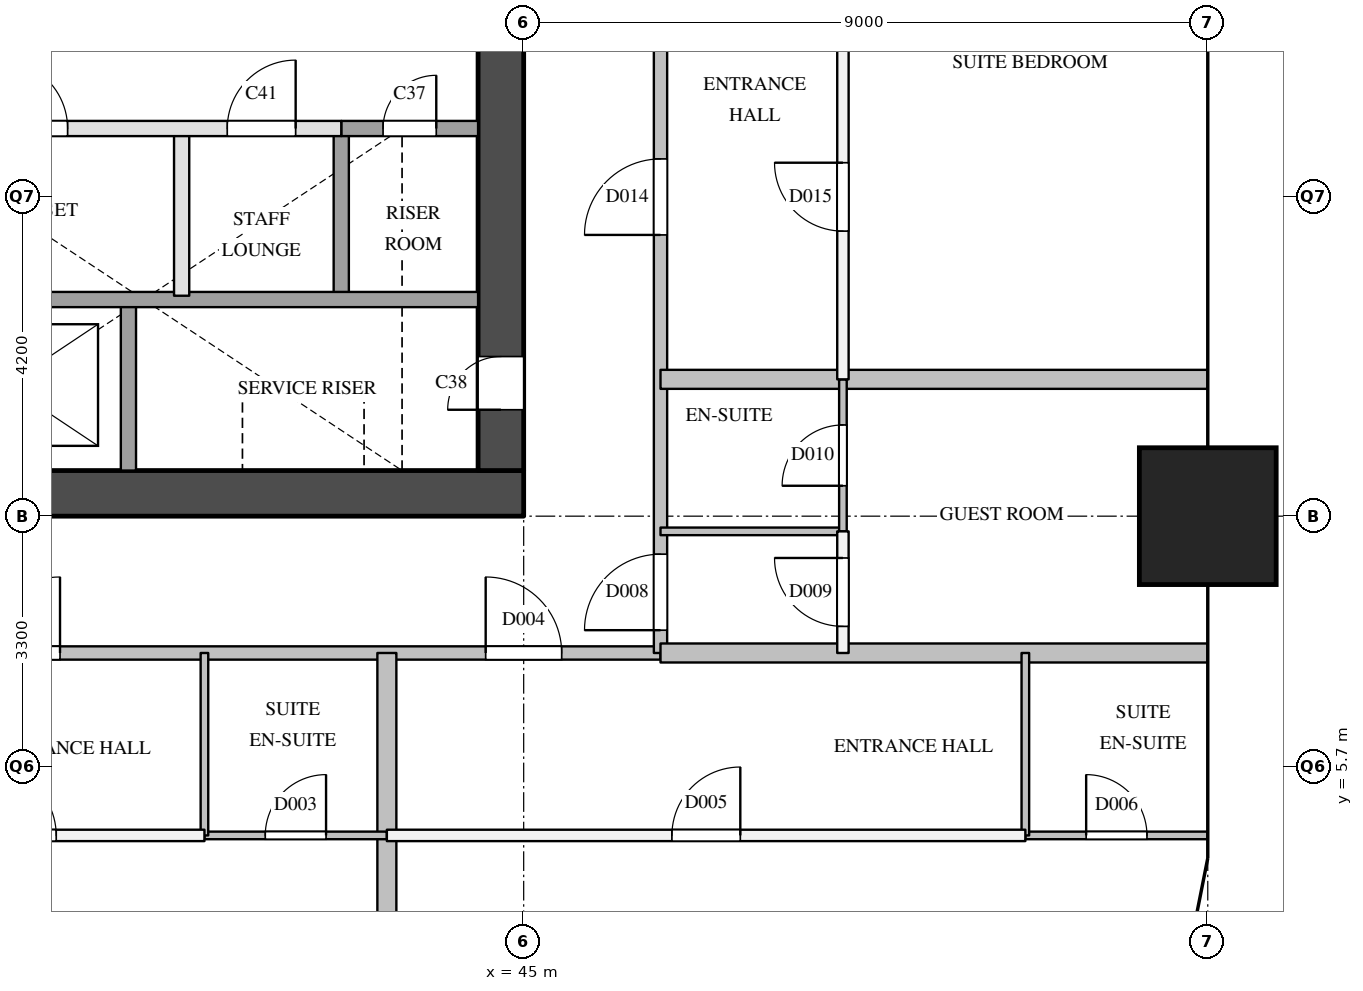
"""IFC4 building model, lengths in metres.
Left out: names, types, materials, properties, quantities, classifications, styles, units other than length and angle.
Written with IfcOpenShell. Run it as: python <this file> out.ifc"""

import sys

from ifc_helpers import new_model, si_unit, direction, frame, frame_2d, origin, origin_2d, place, context, subcontext, project, spatial, rectangle, extrude, element, fill, save


model = new_model("IFC4")
c1 = context("Model", 3, precision=1e-05, world=origin(), true_north=direction((0.0, 1.0)))
c2 = subcontext(c1, "Body", "Model", "MODEL_VIEW")
j1 = project(units=[si_unit("LENGTHUNIT", "METRE"), si_unit("PLANEANGLEUNIT", "RADIAN")], contexts=[c1])
p1 = place(None, origin())
s1 = spatial("IfcSite", under=j1, at=p1, CompositionType="ELEMENT")
p2 = place(p1, origin())
s2 = spatial("IfcBuilding", under=s1, at=p2, CompositionType="ELEMENT")
p3 = place(p2, frame((0.0, 0.0, 112.0)))
s3 = spatial("IfcBuildingStorey", under=s2, at=p3, CompositionType="ELEMENT", Elevation=112.0)
p4 = place(p3, frame((54.0, 9.0, 0.0), z_axis=(0.0, 0.0, 1.0), x_axis=(1.0, 0.0, 0.0)))
e1 = element("IfcColumn", 1, at=p4, inside=s3, PredefinedType="COLUMN", context=c2, shape_type="SweptSolid", body=[
    extrude(rectangle(XDim=1.8, YDim=1.8, at=origin_2d()), origin(), (0.0, 0.0, 1.0), 3.8),
])
p5 = place(p3, frame((36.0, 9.3, 0.0), z_axis=(0.0, 0.0, 1.0), x_axis=(1.0, 0.0, 0.0)))
e2 = element("IfcWall", 2, at=p5, inside=s3, PredefinedType="SHEAR", context=c2, shape_type="SweptSolid", body=[
    extrude(rectangle(XDim=9.0, YDim=0.6, at=frame_2d((4.5, 0.0))), origin(), (0.0, 0.0, 1.0), 3.5),
])
p6 = place(p3, frame((44.7, 9.6, 0.0), z_axis=(0.0, 0.0, 1.0), x_axis=(0.0, 1.0, 0.0)))
e3 = element("IfcWall", 3, at=p6, inside=s3, PredefinedType="SHEAR", context=c2, shape_type="SweptSolid", body=[
    extrude(rectangle(XDim=12.3, YDim=0.6, at=frame_2d((6.15, 0.0))), origin(), (0.0, 0.0, 1.0), 3.5),
])
p7 = place(p6, frame((0.8, 0.0, 0.0)))
e4 = element("IfcOpeningElement", 4, at=p7, cuts=e3, PredefinedType="OPENING", context=c2, shape_type="SweptSolid", body=[
    extrude(rectangle(XDim=0.7, YDim=2.1, at=frame_2d((0.35, 1.05))), frame((0.0, 0.31, 0.0), z_axis=(0.0, -1.0, 0.0), x_axis=(1.0, 0.0, 0.0)), (0.0, 0.0, 1.0), 0.62),
])
p8 = place(p3, frame((39.8, 9.6, 0.0), z_axis=(0.0, 0.0, 1.0), x_axis=(0.0, 1.0, 0.0)))
e5 = element("IfcWall", 5, at=p8, inside=s3, PredefinedType="SOLIDWALL", context=c2, shape_type="SweptSolid", body=[
    extrude(rectangle(XDim=2.3, YDim=0.2, at=frame_2d((1.15, 0.0))), origin(), (0.0, 0.0, 1.0), 3.5),
])
p9 = place(p3, frame((40.5, 11.9, 0.0), z_axis=(0.0, 0.0, 1.0), x_axis=(0.0, 1.0, 0.0)))
e6 = element("IfcWall", 6, at=p9, inside=s3, PredefinedType="PARTITIONING", context=c2, shape_type="SweptSolid", body=[
    extrude(rectangle(XDim=2.2, YDim=0.2, at=frame_2d((1.1, 0.0))), origin(), (0.0, 0.0, 1.0), 3.5),
])
p10 = place(p3, frame((42.6, 11.9, 0.0), z_axis=(0.0, 0.0, 1.0), x_axis=(0.0, 1.0, 0.0)))
e7 = element("IfcWall", 7, at=p10, inside=s3, PredefinedType="SOLIDWALL", context=c2, shape_type="SweptSolid", body=[
    extrude(rectangle(XDim=2.2, YDim=0.2, at=frame_2d((1.1, 0.0))), origin(), (0.0, 0.0, 1.0), 3.5),
])
p11 = place(p3, frame((36.6, 11.85, 0.0), z_axis=(0.0, 0.0, 1.0), x_axis=(1.0, 0.0, 0.0)))
e8 = element("IfcWall", 8, at=p11, inside=s3, PredefinedType="SOLIDWALL", context=c2, shape_type="SweptSolid", body=[
    extrude(rectangle(XDim=7.8, YDim=0.2, at=frame_2d((3.9, 0.0))), origin(), (0.0, 0.0, 1.0), 3.5),
])
p12 = place(p3, frame((36.6, 14.1, 0.0), z_axis=(0.0, 0.0, 1.0), x_axis=(1.0, 0.0, 0.0)))
e9 = element("IfcWall", 9, at=p12, inside=s3, PredefinedType="PARTITIONING", context=c2, shape_type="SweptSolid", body=[
    extrude(rectangle(XDim=6.0, YDim=0.2, at=frame_2d((3.0, 0.0))), origin(), (0.0, 0.0, 1.0), 3.5),
])
p13 = place(p12, frame((1.5, 0.0, 0.0)))
e10 = element("IfcOpeningElement", 10, at=p13, cuts=e9, PredefinedType="OPENING", context=c2, shape_type="SweptSolid", body=[
    extrude(rectangle(XDim=0.9, YDim=2.1, at=frame_2d((0.45, 1.05))), frame((0.0, 0.11, 0.0), z_axis=(0.0, -1.0, 0.0), x_axis=(1.0, 0.0, 0.0)), (0.0, 0.0, 1.0), 0.22),
])
p14 = place(p12, frame((4.5, 0.0, 0.0)))
e11 = element("IfcOpeningElement", 11, at=p14, cuts=e9, PredefinedType="OPENING", context=c2, shape_type="SweptSolid", body=[
    extrude(rectangle(XDim=0.9, YDim=2.1, at=frame_2d((0.45, 1.05))), frame((0.0, 0.11, 0.0), z_axis=(0.0, -1.0, 0.0), x_axis=(1.0, 0.0, 0.0)), (0.0, 0.0, 1.0), 0.22),
])
p15 = place(p3, frame((42.6, 14.1, 0.0), z_axis=(0.0, 0.0, 1.0), x_axis=(1.0, 0.0, 0.0)))
e12 = element("IfcWall", 12, at=p15, inside=s3, PredefinedType="SOLIDWALL", context=c2, shape_type="SweptSolid", body=[
    extrude(rectangle(XDim=1.8, YDim=0.2, at=frame_2d((0.9, 0.0))), origin(), (0.0, 0.0, 1.0), 3.5),
])
p16 = place(p15, frame((0.55, 0.0, 0.0)))
e13 = element("IfcOpeningElement", 13, at=p16, cuts=e12, PredefinedType="OPENING", context=c2, shape_type="SweptSolid", body=[
    extrude(rectangle(XDim=0.7, YDim=2.1, at=frame_2d((0.35, 1.05))), frame((0.0, 0.11, 0.0), z_axis=(0.0, -1.0, 0.0), x_axis=(1.0, 0.0, 0.0)), (0.0, 0.0, 1.0), 0.22),
])
p17 = place(p3, frame((34.2, 7.2, 0.0), z_axis=(0.0, 0.0, 1.0), x_axis=(1.0, 0.0, 0.0)))
e14 = element("IfcWall", 14, at=p17, inside=s3, PredefinedType="PARTITIONING", context=c2, shape_type="SweptSolid", body=[
    extrude(rectangle(XDim=12.6, YDim=0.175, at=frame_2d((6.3, 0.0))), origin(), (0.0, 0.0, 1.0), 3.5),
])
p18 = place(p17, frame((3.7, 0.0, 0.0)))
e15 = element("IfcOpeningElement", 15, at=p18, cuts=e14, PredefinedType="OPENING", context=c2, shape_type="SweptSolid", body=[
    extrude(rectangle(XDim=1.0, YDim=2.1, at=frame_2d((0.5, 1.05))), frame((0.0, 0.097, 0.0), z_axis=(0.0, -1.0, 0.0), x_axis=(1.0, 0.0, 0.0)), (0.0, 0.0, 1.0), 0.195),
])
p19 = place(p17, frame((10.3, 0.0, 0.0)))
e16 = element("IfcOpeningElement", 16, at=p19, cuts=e14, PredefinedType="OPENING", context=c2, shape_type="SweptSolid", body=[
    extrude(rectangle(XDim=1.0, YDim=2.1, at=frame_2d((0.5, 1.05))), frame((0.0, 0.097, 0.0), z_axis=(0.0, -1.0, 0.0), x_axis=(1.0, 0.0, 0.0)), (0.0, 0.0, 1.0), 0.195),
])
p20 = place(p3, frame((46.8, 7.2, 0.0), z_axis=(0.0, 0.0, 1.0), x_axis=(0.0, 1.0, 0.0)))
e17 = element("IfcWall", 17, at=p20, inside=s3, PredefinedType="PARTITIONING", context=c2, shape_type="SweptSolid", body=[
    extrude(rectangle(XDim=16.49, YDim=0.175, at=frame_2d((8.245, 0.0))), origin(), (0.0, 0.0, 1.0), 3.5),
])
p21 = place(p20, frame((0.3, 0.0, 0.0)))
e18 = element("IfcOpeningElement", 18, at=p21, cuts=e17, PredefinedType="OPENING", context=c2, shape_type="SweptSolid", body=[
    extrude(rectangle(XDim=1.0, YDim=2.1, at=frame_2d((0.5, 1.05))), frame((0.0, 0.097, 0.0), z_axis=(0.0, -1.0, 0.0), x_axis=(1.0, 0.0, 0.0)), (0.0, 0.0, 1.0), 0.195),
])
p22 = place(p20, frame((5.5, 0.0, 0.0)))
e19 = element("IfcOpeningElement", 19, at=p22, cuts=e17, PredefinedType="OPENING", context=c2, shape_type="SweptSolid", body=[
    extrude(rectangle(XDim=1.0, YDim=2.1, at=frame_2d((0.5, 1.05))), frame((0.0, 0.097, 0.0), z_axis=(0.0, -1.0, 0.0), x_axis=(1.0, 0.0, 0.0)), (0.0, 0.0, 1.0), 0.195),
])
p23 = place(p20, frame((11.1, 0.0, 0.0)))
e20 = element("IfcOpeningElement", 20, at=p23, cuts=e17, PredefinedType="OPENING", context=c2, shape_type="SweptSolid", body=[
    extrude(rectangle(XDim=1.0, YDim=2.1, at=frame_2d((0.5, 1.05))), frame((0.0, 0.097, 0.0), z_axis=(0.0, -1.0, 0.0), x_axis=(1.0, 0.0, 0.0)), (0.0, 0.0, 1.0), 0.195),
])
p24 = place(p3, frame((36.0, 4.8, 0.0), z_axis=(0.0, 0.0, 1.0), x_axis=(1.0, 0.0, 0.0)))
e21 = element("IfcWall", 21, at=p24, inside=s3, PredefinedType="PARTITIONING", context=c2, shape_type="SweptSolid", body=[
    extrude(rectangle(XDim=4.8, YDim=0.15, at=frame_2d((2.4, 0.0))), origin(), (0.0, 0.0, 1.0), 3.5),
])
p25 = place(p24, frame((1.95, 0.0, 0.0)))
e22 = element("IfcOpeningElement", 22, at=p25, cuts=e21, PredefinedType="OPENING", context=c2, shape_type="SweptSolid", body=[
    extrude(rectangle(XDim=0.9, YDim=2.1, at=frame_2d((0.45, 1.05))), frame((0.0, 0.085, 0.0), z_axis=(0.0, -1.0, 0.0), x_axis=(1.0, 0.0, 0.0)), (0.0, 0.0, 1.0), 0.17),
])
p26 = place(p3, frame((43.2, 4.8, 0.0), z_axis=(0.0, 0.0, 1.0), x_axis=(1.0, 0.0, 0.0)))
e23 = element("IfcWall", 23, at=p26, inside=s3, PredefinedType="PARTITIONING", context=c2, shape_type="SweptSolid", body=[
    extrude(rectangle(XDim=8.4, YDim=0.15, at=frame_2d((4.2, 0.0))), origin(), (0.0, 0.0, 1.0), 3.5),
])
p27 = place(p26, frame((3.75, 0.0, 0.0)))
e24 = element("IfcOpeningElement", 24, at=p27, cuts=e23, PredefinedType="OPENING", context=c2, shape_type="SweptSolid", body=[
    extrude(rectangle(XDim=0.9, YDim=2.1, at=frame_2d((0.45, 1.05))), frame((0.0, 0.085, 0.0), z_axis=(0.0, -1.0, 0.0), x_axis=(1.0, 0.0, 0.0)), (0.0, 0.0, 1.0), 0.17),
])
p28 = place(p3, frame((49.2, 7.2, 0.0), z_axis=(0.0, 0.0, 1.0), x_axis=(0.0, 1.0, 0.0)))
e25 = element("IfcWall", 25, at=p28, inside=s3, PredefinedType="PARTITIONING", context=c2, shape_type="SweptSolid", body=[
    extrude(rectangle(XDim=1.6, YDim=0.15, at=frame_2d((0.8, 0.0))), origin(), (0.0, 0.0, 1.0), 3.5),
])
p29 = place(p28, frame((0.35, 0.0, 0.0)))
e26 = element("IfcOpeningElement", 26, at=p29, cuts=e25, PredefinedType="OPENING", context=c2, shape_type="SweptSolid", body=[
    extrude(rectangle(XDim=0.9, YDim=2.1, at=frame_2d((0.45, 1.05))), frame((0.0, 0.085, 0.0), z_axis=(0.0, -1.0, 0.0), x_axis=(1.0, 0.0, 0.0)), (0.0, 0.0, 1.0), 0.17),
])
p30 = place(p3, frame((49.2, 10.8, 0.0), z_axis=(0.0, 0.0, 1.0), x_axis=(0.0, 1.0, 0.0)))
e27 = element("IfcWall", 27, at=p30, inside=s3, PredefinedType="PARTITIONING", context=c2, shape_type="SweptSolid", body=[
    extrude(rectangle(XDim=4.8, YDim=0.15, at=frame_2d((2.4, 0.0))), origin(), (0.0, 0.0, 1.0), 3.5),
])
p31 = place(p30, frame((1.95, 0.0, 0.0)))
e28 = element("IfcOpeningElement", 28, at=p31, cuts=e27, PredefinedType="OPENING", context=c2, shape_type="SweptSolid", body=[
    extrude(rectangle(XDim=0.9, YDim=2.1, at=frame_2d((0.45, 1.05))), frame((0.0, 0.085, 0.0), z_axis=(0.0, -1.0, 0.0), x_axis=(1.0, 0.0, 0.0)), (0.0, 0.0, 1.0), 0.17),
])
for number, where, z_axis, x_axis in (
    (29, (46.8, 7.2, 0.0), (0.0, 0.0, 1.0), (1.0, 0.0, 0.0)),
    (30, (46.8, 10.8, 0.0), (0.0, 0.0, 1.0), (1.0, 0.0, 0.0)),
    (31, (43.2, 0.0, 0.0), (0.0, 0.0, 1.0), (0.0, 1.0, 0.0)),
):
    element("IfcWall", number, at=place(p3, frame(where, z_axis=z_axis, x_axis=x_axis)), inside=s3, PredefinedType="PARTITIONING", context=c2, shape_type="SweptSolid", body=[
        extrude(rectangle(XDim=7.2, YDim=0.25, at=frame_2d((3.6, 0.0))), origin(), (0.0, 0.0, 1.0), 2.5),
    ])
p32 = place(p3, frame((40.8, 4.8, 0.0), z_axis=(0.0, 0.0, 1.0), x_axis=(1.0, 0.0, 0.0)))
e32 = element("IfcWall", 32, at=p32, inside=s3, PredefinedType="PARTITIONING", context=c2, shape_type="SweptSolid", body=[
    extrude(rectangle(XDim=2.4, YDim=0.1, at=frame_2d((1.2, 0.0))), origin(), (0.0, 0.0, 1.0), 3.5),
])
p33 = place(p32, frame((0.8, 0.0, 0.0)))
e33 = element("IfcOpeningElement", 33, at=p33, cuts=e32, PredefinedType="OPENING", context=c2, shape_type="SweptSolid", body=[
    extrude(rectangle(XDim=0.8, YDim=2.1, at=frame_2d((0.4, 1.05))), frame((0.0, 0.06, 0.0), z_axis=(0.0, -1.0, 0.0), x_axis=(1.0, 0.0, 0.0)), (0.0, 0.0, 1.0), 0.12),
])
p34 = place(p3, frame((51.6, 4.8, 0.0), z_axis=(0.0, 0.0, 1.0), x_axis=(1.0, 0.0, 0.0)))
e34 = element("IfcWall", 34, at=p34, inside=s3, PredefinedType="PARTITIONING", context=c2, shape_type="SweptSolid", body=[
    extrude(rectangle(XDim=2.4, YDim=0.1, at=frame_2d((1.2, 0.0))), origin(), (0.0, 0.0, 1.0), 2.5),
])
p35 = place(p34, frame((0.8, 0.0, 0.0)))
e35 = element("IfcOpeningElement", 35, at=p35, cuts=e34, PredefinedType="OPENING", context=c2, shape_type="SweptSolid", body=[
    extrude(rectangle(XDim=0.8, YDim=2.1, at=frame_2d((0.4, 1.05))), frame((0.0, 0.06, 0.0), z_axis=(0.0, -1.0, 0.0), x_axis=(1.0, 0.0, 0.0)), (0.0, 0.0, 1.0), 0.12),
])
for number, where, z_axis, x_axis in (
    (36, (46.8, 8.8, 0.0), (0.0, 0.0, 1.0), (1.0, 0.0, 0.0)),
    (37, (40.8, 4.8, 0.0), (0.0, 0.0, 1.0), (0.0, 1.0, 0.0)),
):
    element("IfcWall", number, at=place(p3, frame(where, z_axis=z_axis, x_axis=x_axis)), inside=s3, PredefinedType="PARTITIONING", context=c2, shape_type="SweptSolid", body=[
        extrude(rectangle(XDim=2.4, YDim=0.1, at=frame_2d((1.2, 0.0))), origin(), (0.0, 0.0, 1.0), 3.5),
    ])
p36 = place(p3, frame((49.2, 8.8, 0.0), z_axis=(0.0, 0.0, 1.0), x_axis=(0.0, 1.0, 0.0)))
e38 = element("IfcWall", 38, at=p36, inside=s3, PredefinedType="PARTITIONING", context=c2, shape_type="SweptSolid", body=[
    extrude(rectangle(XDim=2.0, YDim=0.1, at=frame_2d((1.0, 0.0))), origin(), (0.0, 0.0, 1.0), 3.5),
])
p37 = place(p36, frame((0.6, 0.0, 0.0)))
e39 = element("IfcOpeningElement", 39, at=p37, cuts=e38, PredefinedType="OPENING", context=c2, shape_type="SweptSolid", body=[
    extrude(rectangle(XDim=0.8, YDim=2.1, at=frame_2d((0.4, 1.05))), frame((0.0, 0.06, 0.0), z_axis=(0.0, -1.0, 0.0), x_axis=(1.0, 0.0, 0.0)), (0.0, 0.0, 1.0), 0.12),
])
p38 = place(p3, frame((51.6, 4.8, 0.0), z_axis=(0.0, 0.0, 1.0), x_axis=(0.0, 1.0, 0.0)))
e40 = element("IfcWall", 40, at=p38, inside=s3, PredefinedType="PARTITIONING", context=c2, shape_type="SweptSolid", body=[
    extrude(rectangle(XDim=2.4, YDim=0.1, at=frame_2d((1.2, 0.0))), origin(), (0.0, 0.0, 1.0), 3.5),
])
p39 = place(p16, origin())
e41 = element("IfcDoor", 41, at=p39, inside=s3, OperationType="SINGLE_SWING_RIGHT", PredefinedType="DOOR", context=c2, shape_type="SweptSolid", body=[
    extrude(rectangle(XDim=0.7, YDim=2.1, at=frame_2d((0.35, 1.05))), frame((0.0, 0.025, 0.0), z_axis=(0.0, -1.0, 0.0), x_axis=(1.0, 0.0, 0.0)), (0.0, 0.0, 1.0), 0.05),
])
fill(e13, e41)
p40 = place(p7, origin())
e42 = element("IfcDoor", 42, at=p40, inside=s3, OperationType="SINGLE_SWING_LEFT", PredefinedType="DOOR", context=c2, shape_type="SweptSolid", body=[
    extrude(rectangle(XDim=0.7, YDim=2.1, at=frame_2d((0.35, 1.05))), frame((0.0, 0.025, 0.0), z_axis=(0.0, -1.0, 0.0), x_axis=(1.0, 0.0, 0.0)), (0.0, 0.0, 1.0), 0.05),
])
fill(e4, e42)
p41 = place(p13, origin())
e43 = element("IfcDoor", 43, at=p41, inside=s3, OperationType="SINGLE_SWING_LEFT", PredefinedType="DOOR", context=c2, shape_type="SweptSolid", body=[
    extrude(rectangle(XDim=0.9, YDim=2.1, at=frame_2d((0.45, 1.05))), frame((0.0, 0.025, 0.0), z_axis=(0.0, -1.0, 0.0), x_axis=(1.0, 0.0, 0.0)), (0.0, 0.0, 1.0), 0.05),
])
fill(e10, e43)
p42 = place(p14, origin())
e44 = element("IfcDoor", 44, at=p42, inside=s3, OperationType="SINGLE_SWING_RIGHT", PredefinedType="DOOR", context=c2, shape_type="SweptSolid", body=[
    extrude(rectangle(XDim=0.9, YDim=2.1, at=frame_2d((0.45, 1.05))), frame((0.0, 0.025, 0.0), z_axis=(0.0, -1.0, 0.0), x_axis=(1.0, 0.0, 0.0)), (0.0, 0.0, 1.0), 0.05),
])
fill(e11, e44)
p43 = place(p18, origin())
e45 = element("IfcDoor", 45, at=p43, inside=s3, OperationType="SINGLE_SWING_RIGHT", PredefinedType="DOOR", context=c2, shape_type="SweptSolid", body=[
    extrude(rectangle(XDim=1.0, YDim=2.1, at=frame_2d((0.5, 1.05))), frame((0.0, 0.025, 0.0), z_axis=(0.0, -1.0, 0.0), x_axis=(1.0, 0.0, 0.0)), (0.0, 0.0, 1.0), 0.05),
])
fill(e15, e45)
p44 = place(p25, origin())
e46 = element("IfcDoor", 46, at=p44, inside=s3, OperationType="SINGLE_SWING_LEFT", PredefinedType="DOOR", context=c2, shape_type="SweptSolid", body=[
    extrude(rectangle(XDim=0.9, YDim=2.1, at=frame_2d((0.45, 1.05))), frame((0.0, 0.025, 0.0), z_axis=(0.0, -1.0, 0.0), x_axis=(1.0, 0.0, 0.0)), (0.0, 0.0, 1.0), 0.05),
])
fill(e22, e46)
p45 = place(p33, origin())
e47 = element("IfcDoor", 47, at=p45, inside=s3, OperationType="SINGLE_SWING_RIGHT", PredefinedType="DOOR", context=c2, shape_type="SweptSolid", body=[
    extrude(rectangle(XDim=0.8, YDim=2.1, at=frame_2d((0.4, 1.05))), frame((0.0, 0.025, 0.0), z_axis=(0.0, -1.0, 0.0), x_axis=(1.0, 0.0, 0.0)), (0.0, 0.0, 1.0), 0.05),
])
fill(e33, e47)
p46 = place(p19, origin())
e48 = element("IfcDoor", 48, at=p46, inside=s3, OperationType="SINGLE_SWING_LEFT", PredefinedType="DOOR", context=c2, shape_type="SweptSolid", body=[
    extrude(rectangle(XDim=1.0, YDim=2.1, at=frame_2d((0.5, 1.05))), frame((0.0, 0.025, 0.0), z_axis=(0.0, -1.0, 0.0), x_axis=(1.0, 0.0, 0.0)), (0.0, 0.0, 1.0), 0.05),
])
fill(e16, e48)
p47 = place(p27, origin())
e49 = element("IfcDoor", 49, at=p47, inside=s3, OperationType="SINGLE_SWING_RIGHT", PredefinedType="DOOR", context=c2, shape_type="SweptSolid", body=[
    extrude(rectangle(XDim=0.9, YDim=2.1, at=frame_2d((0.45, 1.05))), frame((0.0, 0.025, 0.0), z_axis=(0.0, -1.0, 0.0), x_axis=(1.0, 0.0, 0.0)), (0.0, 0.0, 1.0), 0.05),
])
fill(e24, e49)
p48 = place(p35, origin())
e50 = element("IfcDoor", 50, at=p48, inside=s3, OperationType="SINGLE_SWING_LEFT", PredefinedType="DOOR", context=c2, shape_type="SweptSolid", body=[
    extrude(rectangle(XDim=0.8, YDim=2.1, at=frame_2d((0.4, 1.05))), frame((0.0, 0.025, 0.0), z_axis=(0.0, -1.0, 0.0), x_axis=(1.0, 0.0, 0.0)), (0.0, 0.0, 1.0), 0.05),
])
fill(e35, e50)
p49 = place(p21, origin())
e51 = element("IfcDoor", 51, at=p49, inside=s3, OperationType="SINGLE_SWING_LEFT", PredefinedType="DOOR", context=c2, shape_type="SweptSolid", body=[
    extrude(rectangle(XDim=1.0, YDim=2.1, at=frame_2d((0.5, 1.05))), frame((0.0, 0.025, 0.0), z_axis=(0.0, -1.0, 0.0), x_axis=(1.0, 0.0, 0.0)), (0.0, 0.0, 1.0), 0.05),
])
fill(e18, e51)
p50 = place(p29, origin())
e52 = element("IfcDoor", 52, at=p50, inside=s3, OperationType="SINGLE_SWING_RIGHT", PredefinedType="DOOR", context=c2, shape_type="SweptSolid", body=[
    extrude(rectangle(XDim=0.9, YDim=2.1, at=frame_2d((0.45, 1.05))), frame((0.0, 0.025, 0.0), z_axis=(0.0, -1.0, 0.0), x_axis=(1.0, 0.0, 0.0)), (0.0, 0.0, 1.0), 0.05),
])
fill(e26, e52)
p51 = place(p37, origin())
e53 = element("IfcDoor", 53, at=p51, inside=s3, OperationType="SINGLE_SWING_LEFT", PredefinedType="DOOR", context=c2, shape_type="SweptSolid", body=[
    extrude(rectangle(XDim=0.8, YDim=2.1, at=frame_2d((0.4, 1.05))), frame((0.0, 0.025, 0.0), z_axis=(0.0, -1.0, 0.0), x_axis=(1.0, 0.0, 0.0)), (0.0, 0.0, 1.0), 0.05),
])
fill(e39, e53)
p52 = place(p22, origin())
e54 = element("IfcDoor", 54, at=p52, inside=s3, OperationType="SINGLE_SWING_LEFT", PredefinedType="DOOR", context=c2, shape_type="SweptSolid", body=[
    extrude(rectangle(XDim=1.0, YDim=2.1, at=frame_2d((0.5, 1.05))), frame((0.0, 0.025, 0.0), z_axis=(0.0, -1.0, 0.0), x_axis=(1.0, 0.0, 0.0)), (0.0, 0.0, 1.0), 0.05),
])
fill(e19, e54)
p53 = place(p31, origin())
e55 = element("IfcDoor", 55, at=p53, inside=s3, OperationType="SINGLE_SWING_RIGHT", PredefinedType="DOOR", context=c2, shape_type="SweptSolid", body=[
    extrude(rectangle(XDim=0.9, YDim=2.1, at=frame_2d((0.45, 1.05))), frame((0.0, 0.025, 0.0), z_axis=(0.0, -1.0, 0.0), x_axis=(1.0, 0.0, 0.0)), (0.0, 0.0, 1.0), 0.05),
])
fill(e28, e55)
save(model, sys.argv[1])
